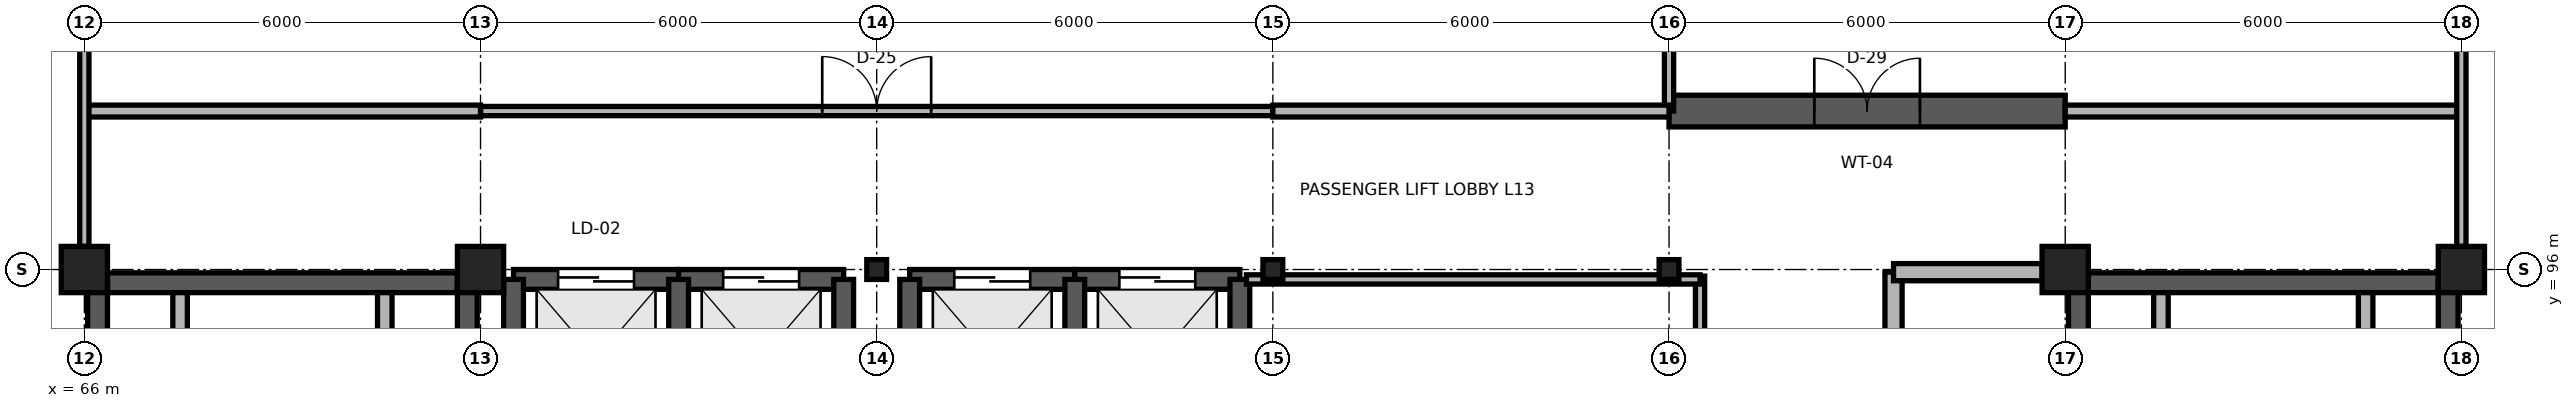
"""IFC4 building model, lengths in metres.
Left out: names, types, materials, properties, quantities, classifications, styles, units other than length and angle.
Written with IfcOpenShell. Run it as: python <this file> out.ifc"""

import sys

from ifc_helpers import new_model, si_unit, direction, frame, frame_2d, origin, origin_2d, place, context, subcontext, project, spatial, rectangle, i_section, extrude, element, fill, save


model = new_model("IFC4")
c1 = context("Model", 3, precision=1e-05, world=origin(), true_north=direction((0.0, 1.0)))
c2 = subcontext(c1, "Body", "Model", "MODEL_VIEW")
j1 = project(units=[si_unit("LENGTHUNIT", "METRE"), si_unit("PLANEANGLEUNIT", "RADIAN")], contexts=[c1])
p1 = place(None, origin())
s1 = spatial("IfcSite", under=j1, at=p1, CompositionType="ELEMENT")
p2 = place(p1, origin())
s2 = spatial("IfcBuilding", under=s1, at=p2, CompositionType="ELEMENT")
p3 = place(p2, frame((0.0, 0.0, 52.2)))
s3 = spatial("IfcBuildingStorey", under=s2, at=p3, CompositionType="ELEMENT", Elevation=52.2)
for number, where, z_axis, x_axis in (
    (1, (66.0, 96.0, 0.0), (0.0, 0.0, 1.0), (1.0, 0.0, 0.0)),
    (2, (72.0, 96.0, 0.0), (0.0, 0.0, 1.0), (1.0, 0.0, 0.0)),
):
    element("IfcColumn", number, at=place(p3, frame(where, z_axis=z_axis, x_axis=x_axis)), inside=s3, PredefinedType="COLUMN", context=c2, shape_type="SweptSolid", body=[
        extrude(rectangle(XDim=0.7, YDim=0.7, at=origin_2d()), origin(), (0.0, 0.0, 1.0), 3.9),
    ])
for number, where, z_axis, x_axis in (
    (3, (78.0, 96.0, 0.0), (0.0, 0.0, 1.0), (1.0, 0.0, 0.0)),
    (4, (84.0, 96.0, 0.0), (0.0, 0.0, 1.0), (1.0, 0.0, 0.0)),
    (5, (90.0, 96.0, 0.0), (0.0, 0.0, 1.0), (1.0, 0.0, 0.0)),
):
    element("IfcColumn", number, at=place(p3, frame(where, z_axis=z_axis, x_axis=x_axis)), inside=s3, PredefinedType="COLUMN", context=c2, shape_type="SweptSolid", body=[
        extrude(i_section(OverallWidth=0.3, OverallDepth=0.3, WebThickness=0.01, FlangeThickness=0.015, FilletRadius=0.018, at=origin_2d()), origin(), (0.0, 0.0, 1.0), 3.9),
    ])
for number, where, z_axis, x_axis in (
    (6, (96.0, 96.0, 0.0), (0.0, 0.0, 1.0), (1.0, 0.0, 0.0)),
    (7, (102.0, 96.0, 0.0), (0.0, 0.0, 1.0), (1.0, 0.0, 0.0)),
):
    element("IfcColumn", number, at=place(p3, frame(where, z_axis=z_axis, x_axis=x_axis)), inside=s3, PredefinedType="COLUMN", context=c2, shape_type="SweptSolid", body=[
        extrude(rectangle(XDim=0.7, YDim=0.7, at=origin_2d()), origin(), (0.0, 0.0, 1.0), 3.9),
    ])
p4 = place(p3, frame((66.35, 95.8, 0.0), z_axis=(0.0, 0.0, 1.0), x_axis=(1.0, 0.0, 0.0)))
e8 = element("IfcWall", 8, at=p4, inside=s3, PredefinedType="SHEAR", context=c2, shape_type="SweptSolid", body=[
    extrude(rectangle(XDim=5.3, YDim=0.3, at=frame_2d((2.65, 0.0))), origin(), (0.0, 0.0, 1.0), 3.74),
])
for number, where, z_axis, x_axis in (
    (9, (66.2, 84.0, 0.0), (0.0, 0.0, 1.0), (0.0, 1.0, 0.0)),
    (10, (71.8, 84.0, 0.0), (0.0, 0.0, 1.0), (0.0, 1.0, 0.0)),
):
    element("IfcWall", number, at=place(p3, frame(where, z_axis=z_axis, x_axis=x_axis)), inside=s3, PredefinedType="SHEAR", context=c2, shape_type="SweptSolid", body=[
        extrude(rectangle(XDim=11.8, YDim=0.3, at=frame_2d((5.9, 0.0))), origin(), (0.0, 0.0, 1.0), 3.74),
    ])
for number, where, z_axis, x_axis in (
    (11, (67.45, 94.4, 0.0), (0.0, 0.0, 1.0), (0.0, 1.0, 0.0)),
    (12, (70.55, 94.4, 0.0), (0.0, 0.0, 1.0), (0.0, 1.0, 0.0)),
):
    element("IfcWall", number, at=place(p3, frame(where, z_axis=z_axis, x_axis=x_axis)), inside=s3, PredefinedType="PARTITIONING", context=c2, shape_type="SweptSolid", body=[
        extrude(rectangle(XDim=1.25, YDim=0.22, at=frame_2d((0.625, 0.0))), origin(), (0.0, 0.0, 1.0), 3.74),
    ])
p5 = place(p3, frame((96.35, 95.8, 0.0), z_axis=(0.0, 0.0, 1.0), x_axis=(1.0, 0.0, 0.0)))
e13 = element("IfcWall", 13, at=p5, inside=s3, PredefinedType="SHEAR", context=c2, shape_type="SweptSolid", body=[
    extrude(rectangle(XDim=5.3, YDim=0.3, at=frame_2d((2.65, 0.0))), origin(), (0.0, 0.0, 1.0), 3.74),
])
for number, where, z_axis, x_axis in (
    (14, (96.2, 84.0, 0.0), (0.0, 0.0, 1.0), (0.0, 1.0, 0.0)),
    (15, (101.8, 84.0, 0.0), (0.0, 0.0, 1.0), (0.0, 1.0, 0.0)),
):
    element("IfcWall", number, at=place(p3, frame(where, z_axis=z_axis, x_axis=x_axis)), inside=s3, PredefinedType="SHEAR", context=c2, shape_type="SweptSolid", body=[
        extrude(rectangle(XDim=11.8, YDim=0.3, at=frame_2d((5.9, 0.0))), origin(), (0.0, 0.0, 1.0), 3.74),
    ])
for number, where, z_axis, x_axis in (
    (16, (97.45, 94.4, 0.0), (0.0, 0.0, 1.0), (0.0, 1.0, 0.0)),
    (17, (100.55, 94.4, 0.0), (0.0, 0.0, 1.0), (0.0, 1.0, 0.0)),
):
    element("IfcWall", number, at=place(p3, frame(where, z_axis=z_axis, x_axis=x_axis)), inside=s3, PredefinedType="PARTITIONING", context=c2, shape_type="SweptSolid", body=[
        extrude(rectangle(XDim=1.25, YDim=0.22, at=frame_2d((0.625, 0.0))), origin(), (0.0, 0.0, 1.0), 3.74),
    ])
p6 = place(p3, frame((72.5, 95.85, 0.0), z_axis=(0.0, 0.0, 1.0), x_axis=(1.0, 0.0, 0.0)))
e18 = element("IfcWall", 18, at=p6, inside=s3, PredefinedType="SHEAR", context=c2, shape_type="SweptSolid", body=[
    extrude(rectangle(XDim=2.5, YDim=0.3, at=frame_2d((1.25, 0.0))), origin(), (0.0, 0.0, 1.0), 3.74),
])
p7 = place(p6, frame((0.675, 0.0, 0.0)))
e19 = element("IfcOpeningElement", 19, at=p7, cuts=e18, PredefinedType="OPENING", context=c2, shape_type="SweptSolid", body=[
    extrude(rectangle(XDim=1.15, YDim=2.15, at=frame_2d((0.575, 1.075))), frame((0.0, 0.165, 0.0), z_axis=(0.0, -1.0, 0.0), x_axis=(1.0, 0.0, 0.0)), (0.0, 0.0, 1.0), 0.33),
])
p8 = place(p3, frame((72.5, 92.45, 0.0), z_axis=(0.0, 0.0, 1.0), x_axis=(0.0, 1.0, 0.0)))
e20 = element("IfcWall", 20, at=p8, inside=s3, PredefinedType="SHEAR", context=c2, shape_type="SweptSolid", body=[
    extrude(rectangle(XDim=3.4, YDim=0.3, at=frame_2d((1.7, 0.0))), origin(), (0.0, 0.0, 1.0), 3.74),
])
p9 = place(p3, frame((75.0, 95.85, 0.0), z_axis=(0.0, 0.0, 1.0), x_axis=(1.0, 0.0, 0.0)))
e21 = element("IfcWall", 21, at=p9, inside=s3, PredefinedType="SHEAR", context=c2, shape_type="SweptSolid", body=[
    extrude(rectangle(XDim=2.5, YDim=0.3, at=frame_2d((1.25, 0.0))), origin(), (0.0, 0.0, 1.0), 3.74),
])
p10 = place(p9, frame((0.675, 0.0, 0.0)))
e22 = element("IfcOpeningElement", 22, at=p10, cuts=e21, PredefinedType="OPENING", context=c2, shape_type="SweptSolid", body=[
    extrude(rectangle(XDim=1.15, YDim=2.15, at=frame_2d((0.575, 1.075))), frame((0.0, 0.165, 0.0), z_axis=(0.0, -1.0, 0.0), x_axis=(1.0, 0.0, 0.0)), (0.0, 0.0, 1.0), 0.33),
])
for number, where, z_axis, x_axis in (
    (23, (75.0, 92.45, 0.0), (0.0, 0.0, 1.0), (0.0, 1.0, 0.0)),
    (24, (77.5, 92.45, 0.0), (0.0, 0.0, 1.0), (0.0, 1.0, 0.0)),
):
    element("IfcWall", number, at=place(p3, frame(where, z_axis=z_axis, x_axis=x_axis)), inside=s3, PredefinedType="SHEAR", context=c2, shape_type="SweptSolid", body=[
        extrude(rectangle(XDim=3.4, YDim=0.3, at=frame_2d((1.7, 0.0))), origin(), (0.0, 0.0, 1.0), 3.74),
    ])
p11 = place(p3, frame((78.5, 95.85, 0.0), z_axis=(0.0, 0.0, 1.0), x_axis=(1.0, 0.0, 0.0)))
e25 = element("IfcWall", 25, at=p11, inside=s3, PredefinedType="SHEAR", context=c2, shape_type="SweptSolid", body=[
    extrude(rectangle(XDim=2.5, YDim=0.3, at=frame_2d((1.25, 0.0))), origin(), (0.0, 0.0, 1.0), 3.74),
])
p12 = place(p11, frame((0.675, 0.0, 0.0)))
e26 = element("IfcOpeningElement", 26, at=p12, cuts=e25, PredefinedType="OPENING", context=c2, shape_type="SweptSolid", body=[
    extrude(rectangle(XDim=1.15, YDim=2.15, at=frame_2d((0.575, 1.075))), frame((0.0, 0.165, 0.0), z_axis=(0.0, -1.0, 0.0), x_axis=(1.0, 0.0, 0.0)), (0.0, 0.0, 1.0), 0.33),
])
p13 = place(p3, frame((78.5, 92.45, 0.0), z_axis=(0.0, 0.0, 1.0), x_axis=(0.0, 1.0, 0.0)))
e27 = element("IfcWall", 27, at=p13, inside=s3, PredefinedType="SHEAR", context=c2, shape_type="SweptSolid", body=[
    extrude(rectangle(XDim=3.4, YDim=0.3, at=frame_2d((1.7, 0.0))), origin(), (0.0, 0.0, 1.0), 3.74),
])
p14 = place(p3, frame((81.0, 95.85, 0.0), z_axis=(0.0, 0.0, 1.0), x_axis=(1.0, 0.0, 0.0)))
e28 = element("IfcWall", 28, at=p14, inside=s3, PredefinedType="SHEAR", context=c2, shape_type="SweptSolid", body=[
    extrude(rectangle(XDim=2.5, YDim=0.3, at=frame_2d((1.25, 0.0))), origin(), (0.0, 0.0, 1.0), 3.74),
])
p15 = place(p14, frame((0.675, 0.0, 0.0)))
e29 = element("IfcOpeningElement", 29, at=p15, cuts=e28, PredefinedType="OPENING", context=c2, shape_type="SweptSolid", body=[
    extrude(rectangle(XDim=1.15, YDim=2.15, at=frame_2d((0.575, 1.075))), frame((0.0, 0.165, 0.0), z_axis=(0.0, -1.0, 0.0), x_axis=(1.0, 0.0, 0.0)), (0.0, 0.0, 1.0), 0.33),
])
for number, where, z_axis, x_axis in (
    (30, (81.0, 92.45, 0.0), (0.0, 0.0, 1.0), (0.0, 1.0, 0.0)),
    (31, (83.5, 92.45, 0.0), (0.0, 0.0, 1.0), (0.0, 1.0, 0.0)),
):
    element("IfcWall", number, at=place(p3, frame(where, z_axis=z_axis, x_axis=x_axis)), inside=s3, PredefinedType="SHEAR", context=c2, shape_type="SweptSolid", body=[
        extrude(rectangle(XDim=3.4, YDim=0.3, at=frame_2d((1.7, 0.0))), origin(), (0.0, 0.0, 1.0), 3.74),
    ])
p16 = place(p3, frame((93.4, 84.0, 0.0), z_axis=(0.0, 0.0, 1.0), x_axis=(0.0, 1.0, 0.0)))
e32 = element("IfcWall", 32, at=p16, inside=s3, PredefinedType="PARTITIONING", context=c2, shape_type="SweptSolid", body=[
    extrude(rectangle(XDim=11.96, YDim=0.26, at=frame_2d((5.98, 0.0))), origin(), (0.0, 0.0, 1.0), 3.74),
])
p17 = place(p16, frame((3.425, 0.0, 0.0)))
e33 = element("IfcOpeningElement", 33, at=p17, cuts=e32, PredefinedType="OPENING", context=c2, shape_type="SweptSolid", body=[
    extrude(rectangle(XDim=1.15, YDim=2.2, at=frame_2d((0.575, 1.1))), frame((0.0, 0.145, 0.0), z_axis=(0.0, -1.0, 0.0), x_axis=(1.0, 0.0, 0.0)), (0.0, 0.0, 1.0), 0.29),
])
p18 = place(p3, frame((93.4, 95.96, 0.0), z_axis=(0.0, 0.0, 1.0), x_axis=(1.0, 0.0, 0.0)))
e34 = element("IfcWall", 34, at=p18, inside=s3, PredefinedType="PARTITIONING", context=c2, shape_type="SweptSolid", body=[
    extrude(rectangle(XDim=2.25, YDim=0.26, at=frame_2d((1.125, 0.0))), origin(), (0.0, 0.0, 1.0), 3.449),
])
p19 = place(p3, frame((72.0, 98.4, 0.0), z_axis=(0.0, 0.0, 1.0), x_axis=(1.0, 0.0, 0.0)))
e35 = element("IfcWall", 35, at=p19, inside=s3, PredefinedType="PARTITIONING", context=c2, shape_type="SweptSolid", body=[
    extrude(rectangle(XDim=12.0, YDim=0.14, at=frame_2d((6.0, 0.0))), origin(), (0.0, 0.0, 1.0), 3.74),
])
p20 = place(p19, frame((5.175, 0.0, 0.0)))
e36 = element("IfcOpeningElement", 36, at=p20, cuts=e35, PredefinedType="OPENING", context=c2, shape_type="SweptSolid", body=[
    extrude(rectangle(XDim=1.65, YDim=2.35, at=frame_2d((0.825, 1.175))), frame((0.0, 0.085, 0.0), z_axis=(0.0, -1.0, 0.0), x_axis=(1.0, 0.0, 0.0)), (0.0, 0.0, 1.0), 0.17),
])
p21 = place(p3, frame((90.0, 98.4, 0.0), z_axis=(0.0, 0.0, 1.0), x_axis=(1.0, 0.0, 0.0)))
e37 = element("IfcWall", 37, at=p21, inside=s3, PredefinedType="SHEAR", context=c2, shape_type="SweptSolid", body=[
    extrude(rectangle(XDim=6.0, YDim=0.48, at=frame_2d((3.0, 0.0))), origin(), (0.0, 0.0, 1.0), 3.74),
])
p22 = place(p21, frame((2.2, 0.0, 0.0)))
e38 = element("IfcOpeningElement", 38, at=p22, cuts=e37, PredefinedType="OPENING", context=c2, shape_type="SweptSolid", body=[
    extrude(rectangle(XDim=1.6, YDim=2.25, at=frame_2d((0.8, 1.125))), frame((0.0, 0.255, 0.0), z_axis=(0.0, -1.0, 0.0), x_axis=(1.0, 0.0, 0.0)), (0.0, 0.0, 1.0), 0.51),
])
p23 = place(p3, frame((90.47, 92.5, 0.0), z_axis=(0.0, 0.0, 1.0), x_axis=(0.0, 1.0, 0.0)))
e39 = element("IfcWall", 39, at=p23, inside=s3, PredefinedType="PARTITIONING", context=c2, shape_type="SweptSolid", body=[
    extrude(rectangle(XDim=3.4, YDim=0.14, at=frame_2d((1.7, 0.0))), origin(), (0.0, 0.0, 1.0), 3.74),
])
p24 = place(p23, frame((1.24, 0.0, 0.0)))
e40 = element("IfcOpeningElement", 40, at=p24, cuts=e39, PredefinedType="OPENING", context=c2, shape_type="SweptSolid", body=[
    extrude(rectangle(XDim=0.92, YDim=2.15, at=frame_2d((0.46, 1.075))), frame((0.0, 0.085, 0.0), z_axis=(0.0, -1.0, 0.0), x_axis=(1.0, 0.0, 0.0)), (0.0, 0.0, 1.0), 0.17),
])
p25 = place(p3, frame((90.0, 98.4, 0.0), z_axis=(0.0, 0.0, 1.0), x_axis=(0.0, 1.0, 0.0)))
e41 = element("IfcWall", 41, at=p25, inside=s3, PredefinedType="PARTITIONING", context=c2, shape_type="SweptSolid", body=[
    extrude(rectangle(XDim=3.15, YDim=0.14, at=frame_2d((1.575, 0.0))), origin(), (0.0, 0.0, 1.0), 3.449),
])
p26 = place(p3, frame((83.6, 95.85, 0.0), z_axis=(0.0, 0.0, 1.0), x_axis=(1.0, 0.0, 0.0)))
e42 = element("IfcWall", 42, at=p26, inside=s3, PredefinedType="PARTITIONING", context=c2, shape_type="SweptSolid", body=[
    extrude(rectangle(XDim=6.87, YDim=0.14, at=frame_2d((3.435, 0.0))), origin(), (0.0, 0.0, 1.0), 3.74),
])
for number, where, z_axis, x_axis in (
    (43, (66.0, 98.4, 0.0), (0.0, 0.0, 1.0), (1.0, 0.0, 0.0)),
    (44, (84.0, 98.4, 0.0), (0.0, 0.0, 1.0), (1.0, 0.0, 0.0)),
    (45, (96.0, 98.4, 0.0), (0.0, 0.0, 1.0), (1.0, 0.0, 0.0)),
):
    element("IfcWall", number, at=place(p3, frame(where, z_axis=z_axis, x_axis=x_axis)), inside=s3, PredefinedType="PARTITIONING", context=c2, shape_type="SweptSolid", body=[
        extrude(rectangle(XDim=6.0, YDim=0.18, at=frame_2d((3.0, 0.0))), origin(), (0.0, 0.0, 1.0), 3.74),
    ])
for number, where, z_axis, x_axis in (
    (46, (66.0, 96.35, 0.0), (0.0, 0.0, 1.0), (0.0, 1.0, 0.0)),
    (47, (102.0, 96.35, 0.0), (0.0, 0.0, 1.0), (0.0, 1.0, 0.0)),
):
    element("IfcWall", number, at=place(p3, frame(where, z_axis=z_axis, x_axis=x_axis)), inside=s3, PredefinedType="PARTITIONING", context=c2, shape_type="SweptSolid", body=[
        extrude(rectangle(XDim=5.3, YDim=0.14, at=frame_2d((2.65, 0.0))), origin(), (0.0, 0.0, 1.0), 3.449),
    ])
p27 = place(p7, origin())
e48 = element("IfcDoor", 48, at=p27, inside=s3, OperationType="DOUBLE_DOOR_SLIDING", PredefinedType="DOOR", context=c2, shape_type="SweptSolid", body=[
    extrude(rectangle(XDim=1.15, YDim=2.15, at=frame_2d((0.575, 1.075))), frame((0.0, 0.025, 0.0), z_axis=(0.0, -1.0, 0.0), x_axis=(1.0, 0.0, 0.0)), (0.0, 0.0, 1.0), 0.05),
])
fill(e19, e48)
p28 = place(p10, origin())
e49 = element("IfcDoor", 49, at=p28, inside=s3, OperationType="DOUBLE_DOOR_SLIDING", PredefinedType="DOOR", context=c2, shape_type="SweptSolid", body=[
    extrude(rectangle(XDim=1.15, YDim=2.15, at=frame_2d((0.575, 1.075))), frame((0.0, 0.025, 0.0), z_axis=(0.0, -1.0, 0.0), x_axis=(1.0, 0.0, 0.0)), (0.0, 0.0, 1.0), 0.05),
])
fill(e22, e49)
p29 = place(p12, origin())
e50 = element("IfcDoor", 50, at=p29, inside=s3, OperationType="DOUBLE_DOOR_SLIDING", PredefinedType="DOOR", context=c2, shape_type="SweptSolid", body=[
    extrude(rectangle(XDim=1.15, YDim=2.15, at=frame_2d((0.575, 1.075))), frame((0.0, 0.025, 0.0), z_axis=(0.0, -1.0, 0.0), x_axis=(1.0, 0.0, 0.0)), (0.0, 0.0, 1.0), 0.05),
])
fill(e26, e50)
p30 = place(p15, origin())
e51 = element("IfcDoor", 51, at=p30, inside=s3, OperationType="DOUBLE_DOOR_SLIDING", PredefinedType="DOOR", context=c2, shape_type="SweptSolid", body=[
    extrude(rectangle(XDim=1.15, YDim=2.15, at=frame_2d((0.575, 1.075))), frame((0.0, 0.025, 0.0), z_axis=(0.0, -1.0, 0.0), x_axis=(1.0, 0.0, 0.0)), (0.0, 0.0, 1.0), 0.05),
])
fill(e29, e51)
p31 = place(p20, origin())
e52 = element("IfcDoor", 52, at=p31, inside=s3, OperationType="DOUBLE_DOOR_SINGLE_SWING", PredefinedType="DOOR", context=c2, shape_type="SweptSolid", body=[
    extrude(rectangle(XDim=1.65, YDim=2.35, at=frame_2d((0.825, 1.175))), frame((0.0, 0.025, 0.0), z_axis=(0.0, -1.0, 0.0), x_axis=(1.0, 0.0, 0.0)), (0.0, 0.0, 1.0), 0.05),
])
fill(e36, e52)
p32 = place(p22, origin())
e53 = element("IfcDoor", 53, at=p32, inside=s3, OperationType="DOUBLE_DOOR_SINGLE_SWING", PredefinedType="DOOR", context=c2, shape_type="SweptSolid", body=[
    extrude(rectangle(XDim=1.6, YDim=2.25, at=frame_2d((0.8, 1.125))), frame((0.0, 0.025, 0.0), z_axis=(0.0, -1.0, 0.0), x_axis=(1.0, 0.0, 0.0)), (0.0, 0.0, 1.0), 0.05),
])
fill(e38, e53)
save(model, sys.argv[1])
